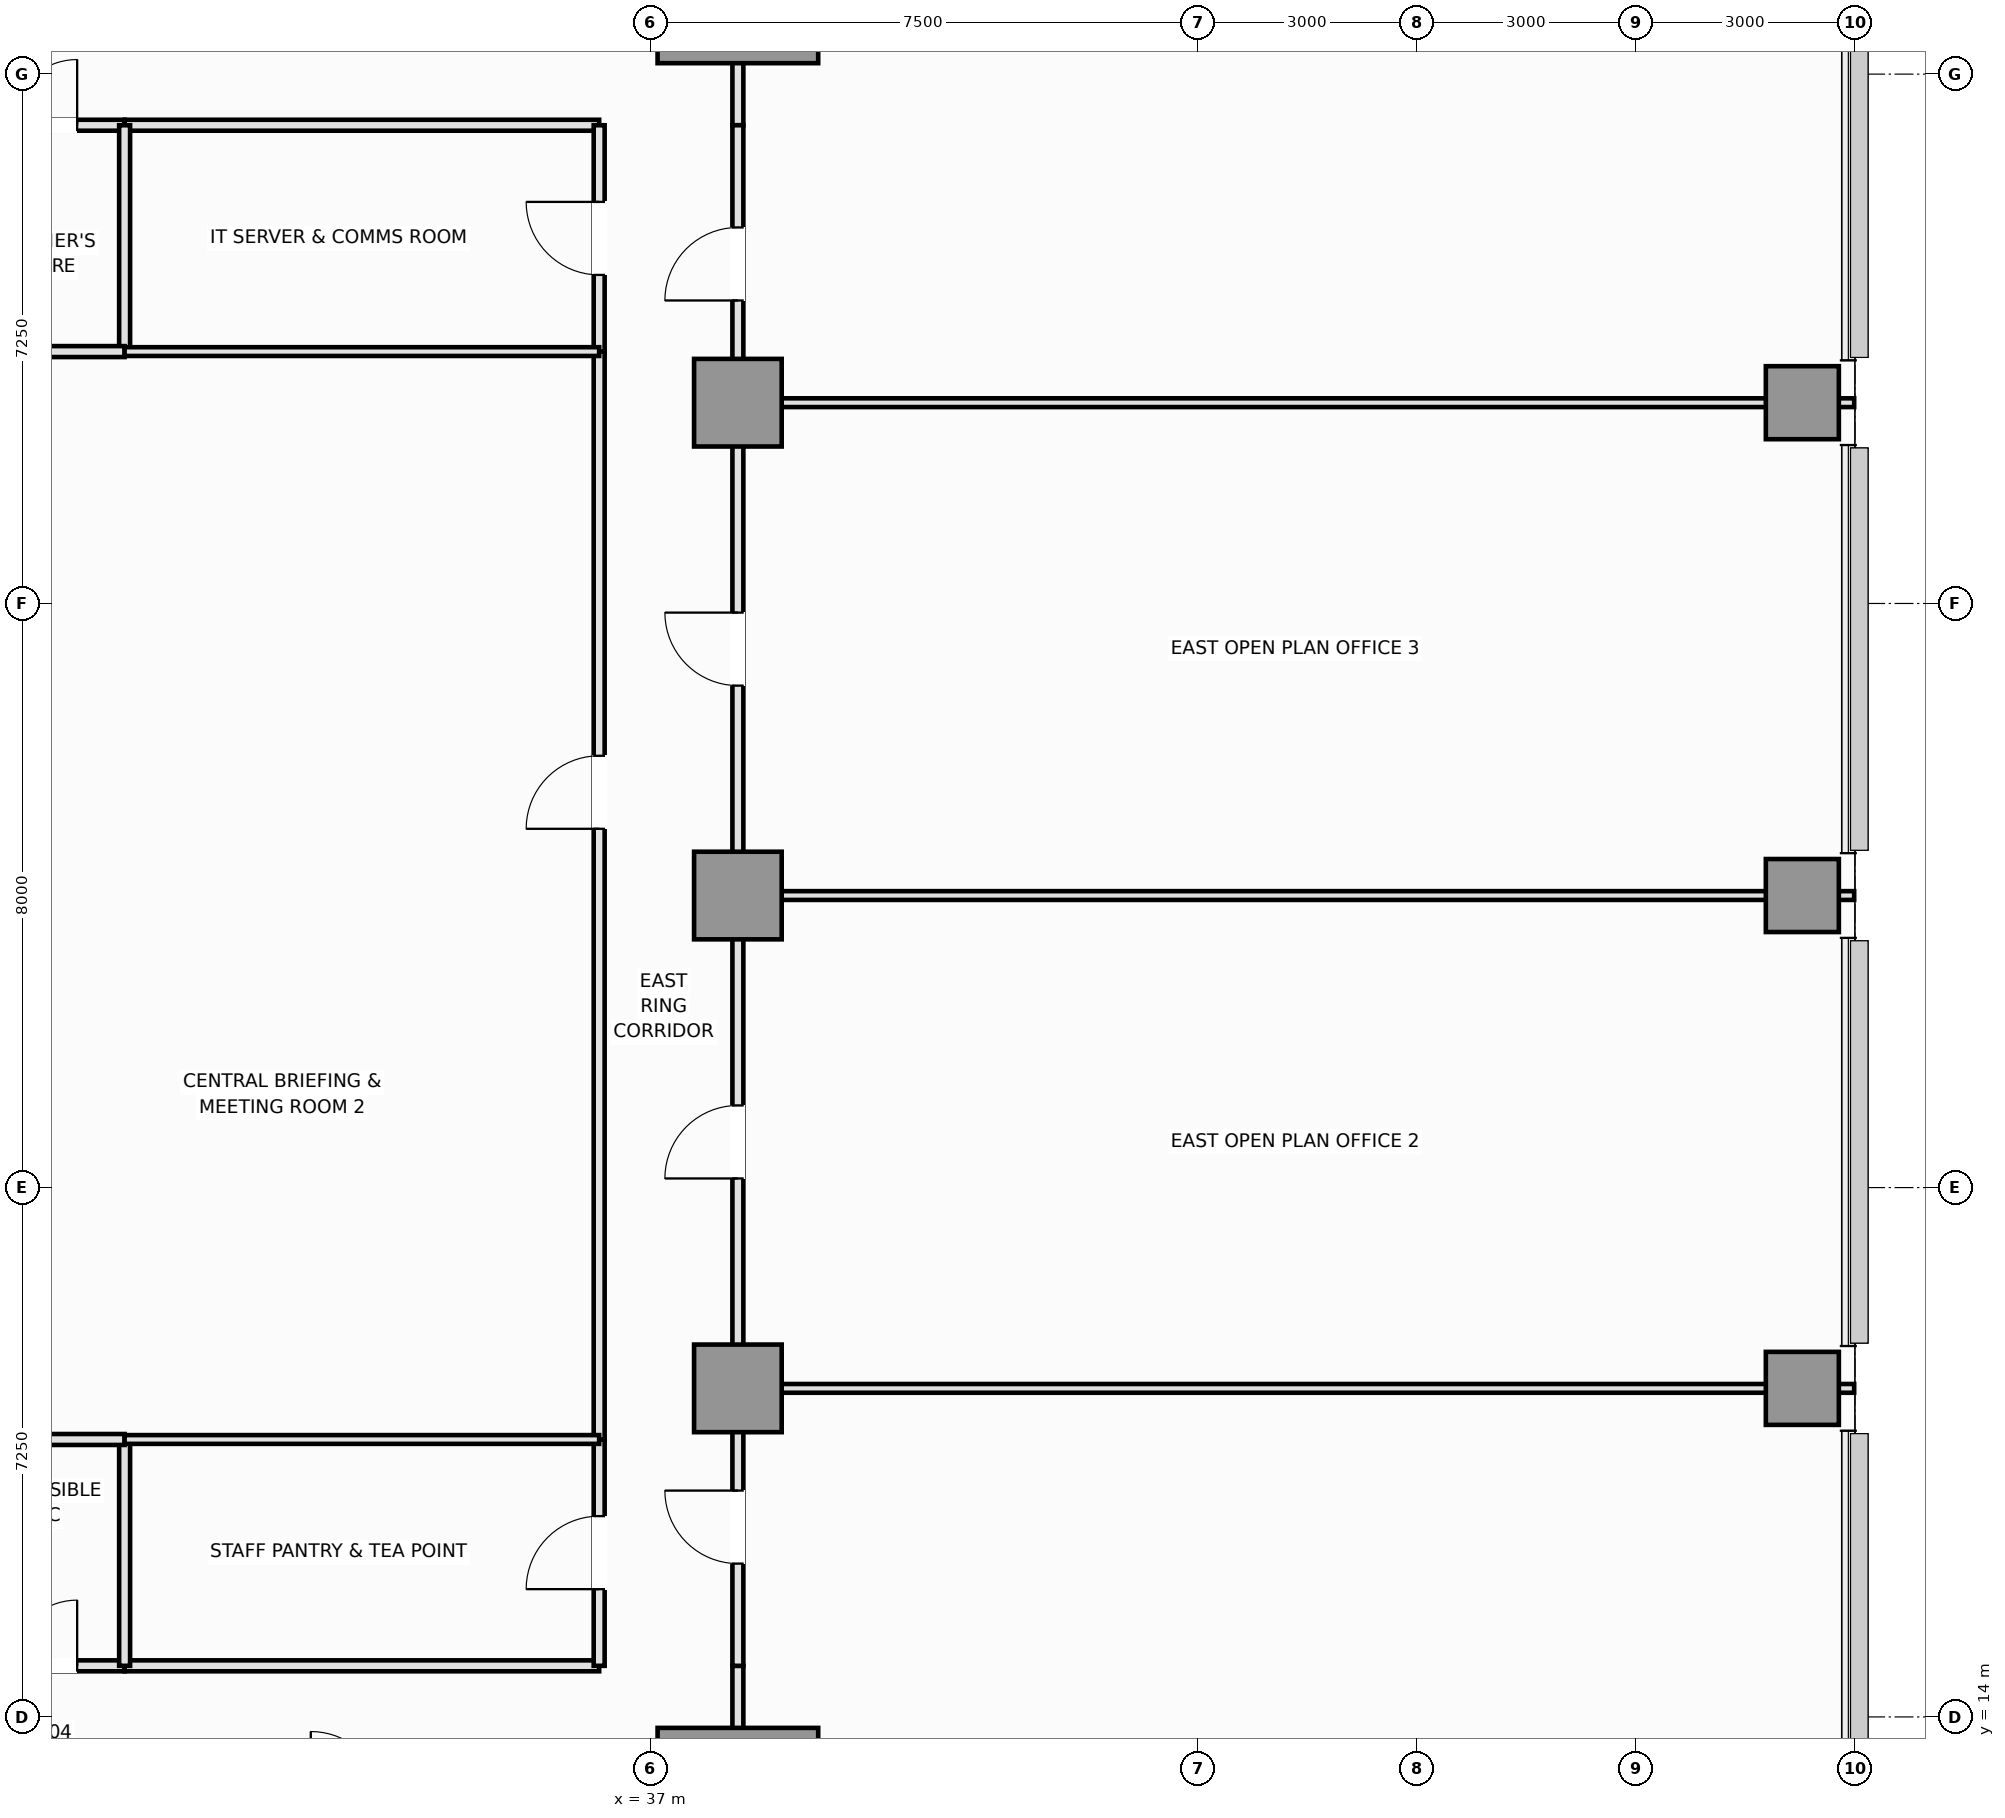
"""IFC4 building model, lengths in metres.
Left out: names, types, materials, properties, quantities, classifications, styles, units other than length and angle.
Written with IfcOpenShell. Run it as: python <this file> out.ifc"""

import sys

from ifc_helpers import new_model, si_unit, direction, frame, frame_2d, origin, origin_2d, place, context, subcontext, project, spatial, rectangle, extrude, element, fill, save


model = new_model("IFC4")
c1 = context("Model", 3, precision=1e-05, world=origin(), true_north=direction((0.0, 1.0)))
c2 = subcontext(c1, "Body", "Model", "MODEL_VIEW")
j1 = project(units=[si_unit("LENGTHUNIT", "METRE"), si_unit("PLANEANGLEUNIT", "RADIAN")], contexts=[c1])
p1 = place(None, origin())
s1 = spatial("IfcSite", under=j1, at=p1, CompositionType="ELEMENT")
p2 = place(p1, origin())
s2 = spatial("IfcBuilding", under=s1, at=p2, CompositionType="ELEMENT")
p3 = place(p2, frame((0.0, 0.0, 25.6)))
s3 = spatial("IfcBuildingStorey", under=s2, at=p3, CompositionType="ELEMENT", Elevation=25.6)
for number, where, z_axis, x_axis in (
    (1, (38.2, 12.75, 0.0), (0.0, 0.0, 1.0), (1.0, 0.0, 0.0)),
    (2, (38.2, 37.75, 0.0), (0.0, 0.0, 1.0), (1.0, 0.0, 0.0)),
):
    element("IfcColumn", number, at=place(p3, frame(where, z_axis=z_axis, x_axis=x_axis)), inside=s3, PredefinedType="COLUMN", context=c2, shape_type="SweptSolid", body=[
        extrude(rectangle(XDim=2.2, YDim=2.2, at=origin_2d()), origin(), (0.0, 0.0, 1.0), 3.55),
    ])
for number, where, z_axis, x_axis in (
    (3, (38.2, 18.5, 0.0), (0.0, 0.0, 1.0), (1.0, 0.0, 0.0)),
    (4, (38.2, 25.25, 0.0), (0.0, 0.0, 1.0), (1.0, 0.0, 0.0)),
    (5, (38.2, 32.0, 0.0), (0.0, 0.0, 1.0), (1.0, 0.0, 0.0)),
):
    element("IfcColumn", number, at=place(p3, frame(where, z_axis=z_axis, x_axis=x_axis)), inside=s3, PredefinedType="COLUMN", context=c2, shape_type="SweptSolid", body=[
        extrude(rectangle(XDim=1.2, YDim=1.2, at=origin_2d()), origin(), (0.0, 0.0, 1.0), 3.55),
    ])
for number, where, z_axis, x_axis in (
    (6, (52.78, 18.5, 0.0), (0.0, 0.0, 1.0), (1.0, 0.0, 0.0)),
    (7, (52.78, 25.25, 0.0), (0.0, 0.0, 1.0), (1.0, 0.0, 0.0)),
    (8, (52.78, 32.0, 0.0), (0.0, 0.0, 1.0), (1.0, 0.0, 0.0)),
):
    element("IfcColumn", number, at=place(p3, frame(where, z_axis=z_axis, x_axis=x_axis)), inside=s3, PredefinedType="COLUMN", context=c2, shape_type="SweptSolid", body=[
        extrude(rectangle(XDim=1.0, YDim=1.0, at=origin_2d()), origin(), (0.0, 0.0, 1.0), 3.55),
    ])
p4 = place(p3, frame((27.6, 14.7, 0.0), z_axis=(0.0, 0.0, 1.0), x_axis=(1.0, 0.0, 0.0)))
e9 = element("IfcWall", 9, at=p4, inside=s3, PredefinedType="PLUMBINGWALL", context=c2, shape_type="SweptSolid", body=[
    extrude(rectangle(XDim=2.2, YDim=0.15, at=frame_2d((1.1, 0.0))), origin(), (0.0, 0.0, 1.0), 3.37),
])
p5 = place(p4, frame((0.65, 0.0, 0.0)))
e10 = element("IfcOpeningElement", 10, at=p5, cuts=e9, PredefinedType="OPENING", context=c2, shape_type="SweptSolid", body=[
    extrude(rectangle(XDim=0.9, YDim=2.1, at=frame_2d((0.45, 1.05))), frame((0.0, 0.085, 0.0), z_axis=(0.0, -1.0, 0.0), x_axis=(1.0, 0.0, 0.0)), (0.0, 0.0, 1.0), 0.17),
])
p6 = place(p3, frame((29.8, 14.7, 0.0), z_axis=(0.0, 0.0, 1.0), x_axis=(1.0, 0.0, 0.0)))
e11 = element("IfcWall", 11, at=p6, inside=s3, PredefinedType="PARTITIONING", context=c2, shape_type="SweptSolid", body=[
    extrude(rectangle(XDim=6.5, YDim=0.15, at=frame_2d((3.25, 0.0))), origin(), (0.0, 0.0, 1.0), 3.37),
])
p7 = place(p3, frame((38.2, 12.8, 0.0), z_axis=(0.0, 0.0, 1.0), x_axis=(0.0, 1.0, 0.0)))
e12 = element("IfcWall", 12, at=p7, inside=s3, PredefinedType="PARTITIONING", context=c2, shape_type="SweptSolid", body=[
    extrude(rectangle(XDim=1.9, YDim=0.15, at=frame_2d((0.95, 0.0))), origin(), (0.0, 0.0, 1.0), 2.82),
])
p8 = place(p3, frame((27.6, 35.8, 0.0), z_axis=(0.0, 0.0, 1.0), x_axis=(1.0, 0.0, 0.0)))
e13 = element("IfcWall", 13, at=p8, inside=s3, PredefinedType="PLUMBINGWALL", context=c2, shape_type="SweptSolid", body=[
    extrude(rectangle(XDim=2.2, YDim=0.15, at=frame_2d((1.1, 0.0))), origin(), (0.0, 0.0, 1.0), 3.37),
])
p9 = place(p8, frame((0.65, 0.0, 0.0)))
e14 = element("IfcOpeningElement", 14, at=p9, cuts=e13, PredefinedType="OPENING", context=c2, shape_type="SweptSolid", body=[
    extrude(rectangle(XDim=0.9, YDim=2.1, at=frame_2d((0.45, 1.05))), frame((0.0, 0.085, 0.0), z_axis=(0.0, -1.0, 0.0), x_axis=(1.0, 0.0, 0.0)), (0.0, 0.0, 1.0), 0.17),
])
p10 = place(p3, frame((29.8, 35.8, 0.0), z_axis=(0.0, 0.0, 1.0), x_axis=(1.0, 0.0, 0.0)))
e15 = element("IfcWall", 15, at=p10, inside=s3, PredefinedType="PARTITIONING", context=c2, shape_type="SweptSolid", body=[
    extrude(rectangle(XDim=6.5, YDim=0.15, at=frame_2d((3.25, 0.0))), origin(), (0.0, 0.0, 1.0), 3.37),
])
p11 = place(p3, frame((38.2, 35.8, 0.0), z_axis=(0.0, 0.0, 1.0), x_axis=(0.0, 1.0, 0.0)))
e16 = element("IfcWall", 16, at=p11, inside=s3, PredefinedType="PARTITIONING", context=c2, shape_type="SweptSolid", body=[
    extrude(rectangle(XDim=1.9, YDim=0.15, at=frame_2d((0.95, 0.0))), origin(), (0.0, 0.0, 1.0), 2.82),
])
p12 = place(p3, frame((36.3, 14.7, 0.0), z_axis=(0.0, 0.0, 1.0), x_axis=(0.0, 1.0, 0.0)))
e17 = element("IfcWall", 17, at=p12, inside=s3, PredefinedType="PARTITIONING", context=c2, shape_type="SweptSolid", body=[
    extrude(rectangle(XDim=3.1, YDim=0.15, at=frame_2d((1.55, 0.0))), origin(), (0.0, 0.0, 1.0), 3.37),
])
p13 = place(p12, frame((1.05, 0.0, 0.0)))
e18 = element("IfcOpeningElement", 18, at=p13, cuts=e17, PredefinedType="OPENING", context=c2, shape_type="SweptSolid", body=[
    extrude(rectangle(XDim=1.0, YDim=2.15, at=frame_2d((0.5, 1.075))), frame((0.0, 0.085, 0.0), z_axis=(0.0, -1.0, 0.0), x_axis=(1.0, 0.0, 0.0)), (0.0, 0.0, 1.0), 0.17),
])
p14 = place(p3, frame((36.3, 32.7, 0.0), z_axis=(0.0, 0.0, 1.0), x_axis=(0.0, 1.0, 0.0)))
e19 = element("IfcWall", 19, at=p14, inside=s3, PredefinedType="PARTITIONING", context=c2, shape_type="SweptSolid", body=[
    extrude(rectangle(XDim=3.1, YDim=0.15, at=frame_2d((1.55, 0.0))), origin(), (0.0, 0.0, 1.0), 3.37),
])
p15 = place(p14, frame((1.05, 0.0, 0.0)))
e20 = element("IfcOpeningElement", 20, at=p15, cuts=e19, PredefinedType="OPENING", context=c2, shape_type="SweptSolid", body=[
    extrude(rectangle(XDim=1.0, YDim=2.15, at=frame_2d((0.5, 1.075))), frame((0.0, 0.085, 0.0), z_axis=(0.0, -1.0, 0.0), x_axis=(1.0, 0.0, 0.0)), (0.0, 0.0, 1.0), 0.17),
])
p16 = place(p3, frame((36.3, 17.8, 0.0), z_axis=(0.0, 0.0, 1.0), x_axis=(0.0, 1.0, 0.0)))
e21 = element("IfcWall", 21, at=p16, inside=s3, PredefinedType="PARTITIONING", context=c2, shape_type="SweptSolid", body=[
    extrude(rectangle(XDim=14.9, YDim=0.15, at=frame_2d((7.45, 0.0))), origin(), (0.0, 0.0, 1.0), 3.37),
])
p17 = place(p16, frame((8.364, 0.0, 0.0)))
e22 = element("IfcOpeningElement", 22, at=p17, cuts=e21, PredefinedType="OPENING", context=c2, shape_type="SweptSolid", body=[
    extrude(rectangle(XDim=1.0, YDim=2.15, at=frame_2d((0.5, 1.075))), frame((0.0, 0.085, 0.0), z_axis=(0.0, -1.0, 0.0), x_axis=(1.0, 0.0, 0.0)), (0.0, 0.0, 1.0), 0.17),
])
p18 = place(p3, frame((38.2, 14.7, 0.0), z_axis=(0.0, 0.0, 1.0), x_axis=(0.0, 1.0, 0.0)))
e23 = element("IfcWall", 23, at=p18, inside=s3, PredefinedType="PARTITIONING", context=c2, shape_type="SweptSolid", body=[
    extrude(rectangle(XDim=3.8, YDim=0.15, at=frame_2d((1.9, 0.0))), origin(), (0.0, 0.0, 1.0), 2.82),
])
p19 = place(p18, frame((1.4, 0.0, 0.0)))
e24 = element("IfcOpeningElement", 24, at=p19, cuts=e23, PredefinedType="OPENING", context=c2, shape_type="SweptSolid", body=[
    extrude(rectangle(XDim=1.0, YDim=2.15, at=frame_2d((0.5, 1.075))), frame((0.0, 0.085, 0.0), z_axis=(0.0, -1.0, 0.0), x_axis=(1.0, 0.0, 0.0)), (0.0, 0.0, 1.0), 0.17),
])
p20 = place(p3, frame((38.2, 18.5, 0.0), z_axis=(0.0, 0.0, 1.0), x_axis=(0.0, 1.0, 0.0)))
e25 = element("IfcWall", 25, at=p20, inside=s3, PredefinedType="PARTITIONING", context=c2, shape_type="SweptSolid", body=[
    extrude(rectangle(XDim=6.75, YDim=0.15, at=frame_2d((3.375, 0.0))), origin(), (0.0, 0.0, 1.0), 2.82),
])
p21 = place(p20, frame((2.875, 0.0, 0.0)))
e26 = element("IfcOpeningElement", 26, at=p21, cuts=e25, PredefinedType="OPENING", context=c2, shape_type="SweptSolid", body=[
    extrude(rectangle(XDim=1.0, YDim=2.15, at=frame_2d((0.5, 1.075))), frame((0.0, 0.085, 0.0), z_axis=(0.0, -1.0, 0.0), x_axis=(1.0, 0.0, 0.0)), (0.0, 0.0, 1.0), 0.17),
])
p22 = place(p3, frame((38.2, 25.25, 0.0), z_axis=(0.0, 0.0, 1.0), x_axis=(0.0, 1.0, 0.0)))
e27 = element("IfcWall", 27, at=p22, inside=s3, PredefinedType="PARTITIONING", context=c2, shape_type="SweptSolid", body=[
    extrude(rectangle(XDim=6.75, YDim=0.15, at=frame_2d((3.375, 0.0))), origin(), (0.0, 0.0, 1.0), 2.82),
])
p23 = place(p22, frame((2.875, 0.0, 0.0)))
e28 = element("IfcOpeningElement", 28, at=p23, cuts=e27, PredefinedType="OPENING", context=c2, shape_type="SweptSolid", body=[
    extrude(rectangle(XDim=1.0, YDim=2.15, at=frame_2d((0.5, 1.075))), frame((0.0, 0.085, 0.0), z_axis=(0.0, -1.0, 0.0), x_axis=(1.0, 0.0, 0.0)), (0.0, 0.0, 1.0), 0.17),
])
p24 = place(p3, frame((38.2, 32.0, 0.0), z_axis=(0.0, 0.0, 1.0), x_axis=(0.0, 1.0, 0.0)))
e29 = element("IfcWall", 29, at=p24, inside=s3, PredefinedType="PARTITIONING", context=c2, shape_type="SweptSolid", body=[
    extrude(rectangle(XDim=3.8, YDim=0.15, at=frame_2d((1.9, 0.0))), origin(), (0.0, 0.0, 1.0), 2.82),
])
p25 = place(p24, frame((1.4, 0.0, 0.0)))
e30 = element("IfcOpeningElement", 30, at=p25, cuts=e29, PredefinedType="OPENING", context=c2, shape_type="SweptSolid", body=[
    extrude(rectangle(XDim=1.0, YDim=2.15, at=frame_2d((0.5, 1.075))), frame((0.0, 0.085, 0.0), z_axis=(0.0, -1.0, 0.0), x_axis=(1.0, 0.0, 0.0)), (0.0, 0.0, 1.0), 0.17),
])
p26 = place(p3, frame((29.8, 14.7, 0.0), z_axis=(0.0, 0.0, 1.0), x_axis=(0.0, 1.0, 0.0)))
e31 = element("IfcWall", 31, at=p26, inside=s3, PredefinedType="PLUMBINGWALL", context=c2, shape_type="SweptSolid", body=[
    extrude(rectangle(XDim=3.1, YDim=0.15, at=frame_2d((1.55, 0.0))), origin(), (0.0, 0.0, 1.0), 3.37),
])
p27 = place(p3, frame((27.6, 17.8, 0.0), z_axis=(0.0, 0.0, 1.0), x_axis=(1.0, 0.0, 0.0)))
e32 = element("IfcWall", 32, at=p27, inside=s3, PredefinedType="PLUMBINGWALL", context=c2, shape_type="SweptSolid", body=[
    extrude(rectangle(XDim=2.2, YDim=0.15, at=frame_2d((1.1, 0.0))), origin(), (0.0, 0.0, 1.0), 3.37),
])
p28 = place(p3, frame((29.8, 32.7, 0.0), z_axis=(0.0, 0.0, 1.0), x_axis=(0.0, 1.0, 0.0)))
e33 = element("IfcWall", 33, at=p28, inside=s3, PredefinedType="PLUMBINGWALL", context=c2, shape_type="SweptSolid", body=[
    extrude(rectangle(XDim=3.1, YDim=0.15, at=frame_2d((1.55, 0.0))), origin(), (0.0, 0.0, 1.0), 3.37),
])
p29 = place(p3, frame((27.6, 32.7, 0.0), z_axis=(0.0, 0.0, 1.0), x_axis=(1.0, 0.0, 0.0)))
e34 = element("IfcWall", 34, at=p29, inside=s3, PredefinedType="PLUMBINGWALL", context=c2, shape_type="SweptSolid", body=[
    extrude(rectangle(XDim=2.2, YDim=0.15, at=frame_2d((1.1, 0.0))), origin(), (0.0, 0.0, 1.0), 3.37),
])
for number, where, z_axis, x_axis in (
    (35, (29.8, 17.8, 0.0), (0.0, 0.0, 1.0), (1.0, 0.0, 0.0)),
    (36, (29.8, 32.7, 0.0), (0.0, 0.0, 1.0), (1.0, 0.0, 0.0)),
):
    element("IfcWall", number, at=place(p3, frame(where, z_axis=z_axis, x_axis=x_axis)), inside=s3, PredefinedType="PARTITIONING", context=c2, shape_type="SweptSolid", body=[
        extrude(rectangle(XDim=6.5, YDim=0.12, at=frame_2d((3.25, 0.0))), origin(), (0.0, 0.0, 1.0), 3.37),
    ])
for number, where, z_axis, x_axis in (
    (37, (38.2, 18.5, 0.0), (0.0, 0.0, 1.0), (1.0, 0.0, 0.0)),
    (38, (38.2, 25.25, 0.0), (0.0, 0.0, 1.0), (1.0, 0.0, 0.0)),
    (39, (38.2, 32.0, 0.0), (0.0, 0.0, 1.0), (1.0, 0.0, 0.0)),
):
    element("IfcWall", number, at=place(p3, frame(where, z_axis=z_axis, x_axis=x_axis)), inside=s3, PredefinedType="PARTITIONING", context=c2, shape_type="SweptSolid", body=[
        extrude(rectangle(XDim=15.29, YDim=0.12, at=frame_2d((7.645, 0.0))), origin(), (0.0, 0.0, 1.0), 2.72),
    ])
p30 = place(p5, origin())
e40 = element("IfcDoor", 40, at=p30, inside=s3, OperationType="SINGLE_SWING_RIGHT", PredefinedType="DOOR", context=c2, shape_type="SweptSolid", body=[
    extrude(rectangle(XDim=0.9, YDim=2.1, at=frame_2d((0.45, 1.05))), frame((0.0, 0.025, 0.0), z_axis=(0.0, -1.0, 0.0), x_axis=(1.0, 0.0, 0.0)), (0.0, 0.0, 1.0), 0.05),
])
fill(e10, e40)
p31 = place(p9, origin())
e41 = element("IfcDoor", 41, at=p31, inside=s3, OperationType="SINGLE_SWING_RIGHT", PredefinedType="DOOR", context=c2, shape_type="SweptSolid", body=[
    extrude(rectangle(XDim=0.9, YDim=2.1, at=frame_2d((0.45, 1.05))), frame((0.0, 0.025, 0.0), z_axis=(0.0, -1.0, 0.0), x_axis=(1.0, 0.0, 0.0)), (0.0, 0.0, 1.0), 0.05),
])
fill(e14, e41)
p32 = place(p13, origin())
e42 = element("IfcDoor", 42, at=p32, inside=s3, OperationType="SINGLE_SWING_LEFT", PredefinedType="DOOR", context=c2, shape_type="SweptSolid", body=[
    extrude(rectangle(XDim=1.0, YDim=2.15, at=frame_2d((0.5, 1.075))), frame((0.0, 0.025, 0.0), z_axis=(0.0, -1.0, 0.0), x_axis=(1.0, 0.0, 0.0)), (0.0, 0.0, 1.0), 0.05),
])
fill(e18, e42)
p33 = place(p15, origin())
e43 = element("IfcDoor", 43, at=p33, inside=s3, OperationType="SINGLE_SWING_RIGHT", PredefinedType="DOOR", context=c2, shape_type="SweptSolid", body=[
    extrude(rectangle(XDim=1.0, YDim=2.15, at=frame_2d((0.5, 1.075))), frame((0.0, 0.025, 0.0), z_axis=(0.0, -1.0, 0.0), x_axis=(1.0, 0.0, 0.0)), (0.0, 0.0, 1.0), 0.05),
])
fill(e20, e43)
p34 = place(p17, origin())
e44 = element("IfcDoor", 44, at=p34, inside=s3, OperationType="SINGLE_SWING_LEFT", PredefinedType="DOOR", context=c2, shape_type="SweptSolid", body=[
    extrude(rectangle(XDim=1.0, YDim=2.15, at=frame_2d((0.5, 1.075))), frame((0.0, 0.025, 0.0), z_axis=(0.0, -1.0, 0.0), x_axis=(1.0, 0.0, 0.0)), (0.0, 0.0, 1.0), 0.05),
])
fill(e22, e44)
p35 = place(p19, origin())
e45 = element("IfcDoor", 45, at=p35, inside=s3, OperationType="SINGLE_SWING_RIGHT", PredefinedType="DOOR", context=c2, shape_type="SweptSolid", body=[
    extrude(rectangle(XDim=1.0, YDim=2.15, at=frame_2d((0.5, 1.075))), frame((0.0, 0.025, 0.0), z_axis=(0.0, -1.0, 0.0), x_axis=(1.0, 0.0, 0.0)), (0.0, 0.0, 1.0), 0.05),
])
fill(e24, e45)
p36 = place(p21, origin())
e46 = element("IfcDoor", 46, at=p36, inside=s3, OperationType="SINGLE_SWING_LEFT", PredefinedType="DOOR", context=c2, shape_type="SweptSolid", body=[
    extrude(rectangle(XDim=1.0, YDim=2.15, at=frame_2d((0.5, 1.075))), frame((0.0, 0.025, 0.0), z_axis=(0.0, -1.0, 0.0), x_axis=(1.0, 0.0, 0.0)), (0.0, 0.0, 1.0), 0.05),
])
fill(e26, e46)
p37 = place(p23, origin())
e47 = element("IfcDoor", 47, at=p37, inside=s3, OperationType="SINGLE_SWING_RIGHT", PredefinedType="DOOR", context=c2, shape_type="SweptSolid", body=[
    extrude(rectangle(XDim=1.0, YDim=2.15, at=frame_2d((0.5, 1.075))), frame((0.0, 0.025, 0.0), z_axis=(0.0, -1.0, 0.0), x_axis=(1.0, 0.0, 0.0)), (0.0, 0.0, 1.0), 0.05),
])
fill(e28, e47)
p38 = place(p25, origin())
e48 = element("IfcDoor", 48, at=p38, inside=s3, OperationType="SINGLE_SWING_LEFT", PredefinedType="DOOR", context=c2, shape_type="SweptSolid", body=[
    extrude(rectangle(XDim=1.0, YDim=2.15, at=frame_2d((0.5, 1.075))), frame((0.0, 0.025, 0.0), z_axis=(0.0, -1.0, 0.0), x_axis=(1.0, 0.0, 0.0)), (0.0, 0.0, 1.0), 0.05),
])
fill(e30, e48)
save(model, sys.argv[1])
